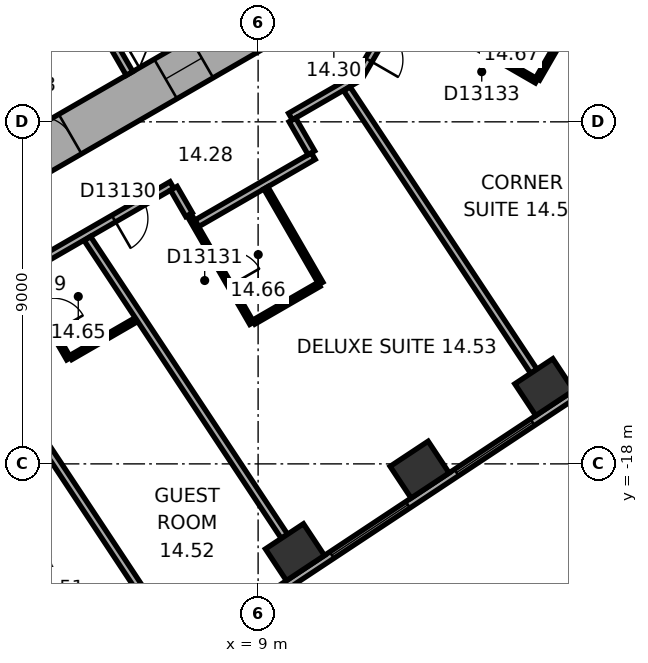
"""IFC4 building model, lengths in metres.
Left out: names, types, materials, properties, quantities, classifications, styles, units other than length and angle.
Written with IfcOpenShell. Run it as: python <this file> out.ifc"""

import sys

from ifc_helpers import new_model, si_unit, direction, frame, frame_2d, origin, origin_2d, place, context, subcontext, project, spatial, rectangle, extrude, element, fill, save


model = new_model("IFC4")
c1 = context("Model", 3, precision=1e-05, world=origin(), true_north=direction((0.0, 1.0)))
c2 = subcontext(c1, "Body", "Model", "MODEL_VIEW")
j1 = project(units=[si_unit("LENGTHUNIT", "METRE"), si_unit("PLANEANGLEUNIT", "RADIAN")], contexts=[c1])
p1 = place(None, origin())
s1 = spatial("IfcSite", under=j1, at=p1, CompositionType="ELEMENT")
p2 = place(p1, origin())
s2 = spatial("IfcBuilding", under=s1, at=p2, CompositionType="ELEMENT")
p3 = place(p2, frame((0.0, 0.0, 67.1)))
s3 = spatial("IfcBuildingStorey", under=s2, at=p3, CompositionType="ELEMENT", Elevation=67.1)
for number, where, z_axis, x_axis in (
    (1, (9.969, -20.324, 0.0), (0.0, 0.0, 1.0), (0.834, 0.552, 0.0)),
    (2, (13.25, -18.152, 0.0), (0.0, 0.0, 1.0), (0.834, 0.552, 0.0)),
    (3, (16.531, -15.981, 0.0), (0.0, 0.0, 1.0), (0.834, 0.552, 0.0)),
):
    element("IfcColumn", number, at=place(p3, frame(where, z_axis=z_axis, x_axis=x_axis)), inside=s3, PredefinedType="COLUMN", context=c2, shape_type="SweptSolid", body=[
        extrude(rectangle(XDim=1.2, YDim=1.0, at=origin_2d()), origin(), (0.0, 0.0, 1.0), 3.3),
    ])
p4 = place(p3, frame((-0.3, -11.836, 0.0), z_axis=(0.0, 0.0, 1.0), x_axis=(0.866021384402, 0.500006961711, 0.0)))
e4 = element("IfcWall", 4, at=p4, inside=s3, PredefinedType="SHEAR", context=c2, shape_type="SweptSolid", body=[
    extrude(rectangle(XDim=12.355, YDim=1.2, at=frame_2d((6.178, 0.0))), origin(), (0.0, 0.0, 1.0), 3.3),
])
p5 = place(p4, frame((4.128, 0.0, 0.0)))
e5 = element("IfcOpeningElement", 5, at=p5, cuts=e4, PredefinedType="OPENING", context=c2, shape_type="SweptSolid", body=[
    extrude(rectangle(XDim=0.9, YDim=2.1, at=frame_2d((0.45, 1.05))), frame((0.0, 0.61, 0.0), z_axis=(0.0, -1.0, 0.0), x_axis=(1.0, 0.0, 0.0)), (0.0, 0.0, 1.0), 1.22),
])
p6 = place(p4, frame((7.928, 0.0, 0.0)))
e6 = element("IfcOpeningElement", 6, at=p6, cuts=e4, PredefinedType="OPENING", context=c2, shape_type="SweptSolid", body=[
    extrude(rectangle(XDim=1.1, YDim=2.1, at=frame_2d((0.55, 1.05))), frame((0.0, 0.61, 0.0), z_axis=(0.0, -1.0, 0.0), x_axis=(1.0, 0.0, 0.0)), (0.0, 0.0, 1.0), 1.22),
])
p7 = place(p3, frame((3.083, -25.601, 0.0), z_axis=(0.0, 0.0, 1.0), x_axis=(0.833884295743, 0.551939291329, 0.0)))
e7 = element("IfcWall", 7, at=p7, inside=s3, PredefinedType="STANDARD", context=c2, shape_type="SweptSolid", body=[
    extrude(rectangle(XDim=21.246, YDim=0.2, at=frame_2d((10.623, 0.0))), origin(), (0.0, 0.0, 1.0), 3.3),
])
p8 = place(p7, frame((1.553, 0.0, 0.8)))
e8 = element("IfcOpeningElement", 8, at=p8, cuts=e7, PredefinedType="OPENING", context=c2, shape_type="SweptSolid", body=[
    extrude(rectangle(XDim=2.4, YDim=1.7, at=frame_2d((1.2, 0.85))), frame((0.0, 0.11, 0.0), z_axis=(0.0, -1.0, 0.0), x_axis=(1.0, 0.0, 0.0)), (0.0, 0.0, 1.0), 0.22),
])
p9 = place(p7, frame((5.488, 0.0, 0.8)))
e9 = element("IfcOpeningElement", 9, at=p9, cuts=e7, PredefinedType="OPENING", context=c2, shape_type="SweptSolid", body=[
    extrude(rectangle(XDim=2.4, YDim=1.7, at=frame_2d((1.2, 0.85))), frame((0.0, 0.11, 0.0), z_axis=(0.0, -1.0, 0.0), x_axis=(1.0, 0.0, 0.0)), (0.0, 0.0, 1.0), 0.22),
])
p10 = place(p7, frame((9.422, 0.0, 0.8)))
e10 = element("IfcOpeningElement", 10, at=p10, cuts=e7, PredefinedType="OPENING", context=c2, shape_type="SweptSolid", body=[
    extrude(rectangle(XDim=2.4, YDim=1.7, at=frame_2d((1.2, 0.85))), frame((0.0, 0.11, 0.0), z_axis=(0.0, -1.0, 0.0), x_axis=(1.0, 0.0, 0.0)), (0.0, 0.0, 1.0), 0.22),
])
p11 = place(p7, frame((13.357, 0.0, 0.8)))
e11 = element("IfcOpeningElement", 11, at=p11, cuts=e7, PredefinedType="OPENING", context=c2, shape_type="SweptSolid", body=[
    extrude(rectangle(XDim=2.4, YDim=1.7, at=frame_2d((1.2, 0.85))), frame((0.0, 0.11, 0.0), z_axis=(0.0, -1.0, 0.0), x_axis=(1.0, 0.0, 0.0)), (0.0, 0.0, 1.0), 0.22),
])
p12 = place(p7, frame((17.291, 0.0, 0.8)))
e12 = element("IfcOpeningElement", 12, at=p12, cuts=e7, PredefinedType="OPENING", context=c2, shape_type="SweptSolid", body=[
    extrude(rectangle(XDim=2.4, YDim=1.7, at=frame_2d((1.2, 0.85))), frame((0.0, 0.11, 0.0), z_axis=(0.0, -1.0, 0.0), x_axis=(1.0, 0.0, 0.0)), (0.0, 0.0, 1.0), 0.22),
])
p13 = place(p3, frame((-0.024, -8.559, 0.0), z_axis=(0.0, 0.0, 1.0), x_axis=(0.866026010844, 0.49999894854, 0.0)))
e13 = element("IfcWall", 13, at=p13, inside=s3, PredefinedType="PARTITIONING", context=c2, shape_type="SweptSolid", body=[
    extrude(rectangle(XDim=8.0, YDim=0.2, at=frame_2d((4.0, 0.0))), origin(), (0.0, 0.0, 1.0), 3.05),
])
p14 = place(p3, frame((4.516, -5.822, 0.0), z_axis=(0.0, 0.0, 1.0), x_axis=(0.499946605688, -0.86605622881, 0.0)))
e14 = element("IfcWall", 14, at=p14, inside=s3, PredefinedType="PARTITIONING", context=c2, shape_type="SweptSolid", body=[
    extrude(rectangle(XDim=2.2, YDim=0.2, at=frame_2d((1.1, 0.0))), origin(), (0.0, 0.0, 1.0), 3.05),
])
p15 = place(p3, frame((0.847, -7.767, 0.0), z_axis=(0.0, 0.0, 1.0), x_axis=(0.866027801685, 0.499995846692, 0.0)))
e15 = element("IfcWall", 15, at=p15, inside=s3, PredefinedType="SHEAR", context=c2, shape_type="SweptSolid", body=[
    extrude(rectangle(XDim=7.06, YDim=0.3, at=frame_2d((3.53, 0.0))), origin(), (0.0, 0.0, 1.0), 3.05),
])
p16 = place(p3, frame((1.033, -13.953, 0.0), z_axis=(0.0, 0.0, 1.0), x_axis=(0.866017531406, 0.500013635111, 0.0)))
e16 = element("IfcWall", 16, at=p16, inside=s3, PredefinedType="PARTITIONING", context=c2, shape_type="SweptSolid", body=[
    extrude(rectangle(XDim=6.58, YDim=0.2, at=frame_2d((3.29, 0.0))), origin(), (0.0, 0.0, 1.0), 3.05),
])
p17 = place(p16, frame((0.496, 0.0, 0.0)))
e17 = element("IfcOpeningElement", 17, at=p17, cuts=e16, PredefinedType="OPENING", context=c2, shape_type="SweptSolid", body=[
    extrude(rectangle(XDim=0.9, YDim=2.1, at=frame_2d((0.45, 1.05))), frame((0.0, 0.11, 0.0), z_axis=(0.0, -1.0, 0.0), x_axis=(1.0, 0.0, 0.0)), (0.0, 0.0, 1.0), 0.22),
])
p18 = place(p16, frame((4.811, 0.0, 0.0)))
e18 = element("IfcOpeningElement", 18, at=p18, cuts=e16, PredefinedType="OPENING", context=c2, shape_type="SweptSolid", body=[
    extrude(rectangle(XDim=0.9, YDim=2.1, at=frame_2d((0.45, 1.05))), frame((0.0, 0.11, 0.0), z_axis=(0.0, -1.0, 0.0), x_axis=(1.0, 0.0, 0.0)), (0.0, 0.0, 1.0), 0.22),
])
p19 = place(p3, frame((4.015, -15.233, 0.0), z_axis=(0.0, 0.0, 1.0), x_axis=(-0.499961950354, 0.866047370643, 0.0)))
e19 = element("IfcWall", 19, at=p19, inside=s3, PredefinedType="PARTITIONING", context=c2, shape_type="SweptSolid", body=[
    extrude(rectangle(XDim=2.5, YDim=0.12, at=frame_2d((1.25, 0.0))), origin(), (0.0, 0.0, 1.0), 3.05),
])
p20 = place(p19, frame((0.8, 0.0, 0.0)))
e20 = element("IfcOpeningElement", 20, at=p20, cuts=e19, PredefinedType="OPENING", context=c2, shape_type="SweptSolid", body=[
    extrude(rectangle(XDim=0.9, YDim=2.1, at=frame_2d((0.45, 1.05))), frame((0.0, 0.07, 0.0), z_axis=(0.0, -1.0, 0.0), x_axis=(1.0, 0.0, 0.0)), (0.0, 0.0, 1.0), 0.14),
])
p21 = place(p3, frame((5.798, -14.204, 0.0), z_axis=(0.0, 0.0, 1.0), x_axis=(-0.865972029493, -0.500092435591, 0.0)))
e21 = element("IfcWall", 21, at=p21, inside=s3, PredefinedType="PARTITIONING", context=c2, shape_type="SweptSolid", body=[
    extrude(rectangle(XDim=1.999, YDim=0.12, at=frame_2d((1.0, 0.0))), origin(), (0.0, 0.0, 1.0), 3.05),
])
p22 = place(p3, frame((6.412, -22.079, 0.0), z_axis=(0.0, 0.0, 1.0), x_axis=(-0.551919507115, 0.83389739037, 0.0)))
e22 = element("IfcWall", 22, at=p22, inside=s3, PredefinedType="PARTITIONING", context=c2, shape_type="SweptSolid", body=[
    extrude(rectangle(XDim=9.635, YDim=0.2, at=frame_2d((4.817, 0.0))), origin(), (0.0, 0.0, 1.0), 3.05),
])
p23 = place(p3, frame((6.782, -10.749, 0.0), z_axis=(0.0, 0.0, 1.0), x_axis=(0.500170954823, -0.865926680471, 0.0)))
e23 = element("IfcWall", 23, at=p23, inside=s3, PredefinedType="PARTITIONING", context=c2, shape_type="SweptSolid", body=[
    extrude(rectangle(XDim=0.801, YDim=0.2, at=frame_2d((0.4, 0.0))), origin(), (0.0, 0.0, 1.0), 3.05),
])
p24 = place(p3, frame((7.385, -11.673, 0.0), z_axis=(0.0, 0.0, 1.0), x_axis=(0.866037524642, 0.499979005472, 0.0)))
e24 = element("IfcWall", 24, at=p24, inside=s3, PredefinedType="PARTITIONING", context=c2, shape_type="SweptSolid", body=[
    extrude(rectangle(XDim=3.542, YDim=0.2, at=frame_2d((1.771, 0.0))), origin(), (0.0, 0.0, 1.0), 3.05),
])
p25 = place(p3, frame((8.833, -14.301, 0.0), z_axis=(0.0, 0.0, 1.0), x_axis=(-0.499936836718, 0.866061868051, 0.0)))
e25 = element("IfcWall", 25, at=p25, inside=s3, PredefinedType="PARTITIONING", context=c2, shape_type="SweptSolid", body=[
    extrude(rectangle(XDim=3.188, YDim=0.12, at=frame_2d((1.594, 0.0))), origin(), (0.0, 0.0, 1.0), 3.05),
])
p26 = place(p25, frame((1.144, 0.0, 0.0)))
e26 = element("IfcOpeningElement", 26, at=p26, cuts=e25, PredefinedType="OPENING", context=c2, shape_type="SweptSolid", body=[
    extrude(rectangle(XDim=0.9, YDim=2.1, at=frame_2d((0.45, 1.05))), frame((0.0, 0.07, 0.0), z_axis=(0.0, -1.0, 0.0), x_axis=(1.0, 0.0, 0.0)), (0.0, 0.0, 1.0), 0.14),
])
p27 = place(p3, frame((9.203, -10.738, 0.0), z_axis=(0.0, 0.0, 1.0), x_axis=(0.50005036918, -0.865996321171, 0.0)))
e27 = element("IfcWall", 27, at=p27, inside=s3, PredefinedType="PARTITIONING", context=c2, shape_type="SweptSolid", body=[
    extrude(rectangle(XDim=2.9, YDim=0.12, at=frame_2d((1.45, 0.0))), origin(), (0.0, 0.0, 1.0), 3.05),
])
p28 = place(p3, frame((9.693, -19.907, 0.0), z_axis=(0.0, 0.0, 1.0), x_axis=(-0.551938394837, 0.833884889121, 0.0)))
e28 = element("IfcWall", 28, at=p28, inside=s3, PredefinedType="PARTITIONING", context=c2, shape_type="SweptSolid", body=[
    extrude(rectangle(XDim=9.394, YDim=0.2, at=frame_2d((4.697, 0.0))), origin(), (0.0, 0.0, 1.0), 2.6),
])
p29 = place(p3, frame((9.852, -8.861, 0.0), z_axis=(0.0, 0.0, 1.0), x_axis=(0.866013291437, 0.500020978615, 0.0)))
e29 = element("IfcWall", 29, at=p29, inside=s3, PredefinedType="PARTITIONING", context=c2, shape_type="SweptSolid", body=[
    extrude(rectangle(XDim=2.077, YDim=0.2, at=frame_2d((1.038, 0.0))), origin(), (0.0, 0.0, 1.0), 3.05),
])
p30 = place(p3, frame((10.402, -9.815, 0.0), z_axis=(0.0, 0.0, 1.0), x_axis=(-0.499968756647, 0.866043441391, 0.0)))
e30 = element("IfcWall", 30, at=p30, inside=s3, PredefinedType="PARTITIONING", context=c2, shape_type="SweptSolid", body=[
    extrude(rectangle(XDim=1.001, YDim=0.2, at=frame_2d((0.5, 0.0))), origin(), (0.0, 0.0, 1.0), 3.05),
])
p31 = place(p3, frame((10.601, -13.28, 0.0), z_axis=(0.0, 0.0, 1.0), x_axis=(-0.866044057189, -0.499967689963, 0.0)))
e31 = element("IfcWall", 31, at=p31, inside=s3, PredefinedType="PARTITIONING", context=c2, shape_type="SweptSolid", body=[
    extrude(rectangle(XDim=1.982, YDim=0.12, at=frame_2d((0.991, 0.0))), origin(), (0.0, 0.0, 1.0), 3.05),
])
p32 = place(p3, frame((11.67, -7.788, 0.0), z_axis=(0.0, 0.0, 1.0), x_axis=(0.500063286585, 0.865988862174, 0.0)))
e32 = element("IfcWall", 32, at=p32, inside=s3, PredefinedType="PARTITIONING", context=c2, shape_type="SweptSolid", body=[
    extrude(rectangle(XDim=1.86, YDim=0.2, at=frame_2d((0.93, 0.0))), origin(), (0.0, 0.0, 1.0), 3.05),
])
p33 = place(p32, frame((0.48, 0.0, 0.0)))
e33 = element("IfcOpeningElement", 33, at=p33, cuts=e32, PredefinedType="OPENING", context=c2, shape_type="SweptSolid", body=[
    extrude(rectangle(XDim=0.9, YDim=2.1, at=frame_2d((0.45, 1.05))), frame((0.0, 0.11, 0.0), z_axis=(0.0, -1.0, 0.0), x_axis=(1.0, 0.0, 0.0)), (0.0, 0.0, 1.0), 0.22),
])
p34 = place(p3, frame((16.255, -15.564, 0.0), z_axis=(0.0, 0.0, 1.0), x_axis=(-0.55192208744, 0.833895682562, 0.0)))
e34 = element("IfcWall", 34, at=p34, inside=s3, PredefinedType="PARTITIONING", context=c2, shape_type="SweptSolid", body=[
    extrude(rectangle(XDim=8.913, YDim=0.2, at=frame_2d((4.457, 0.0))), origin(), (0.0, 0.0, 1.0), 2.6),
])
p35 = place(p3, frame((16.326, -7.925, 0.0), z_axis=(0.0, 0.0, 1.0), x_axis=(-0.865997131366, 0.500048966069, 0.0)))
e35 = element("IfcWall", 35, at=p35, inside=s3, PredefinedType="PARTITIONING", context=c2, shape_type="SweptSolid", body=[
    extrude(rectangle(XDim=2.74, YDim=0.12, at=frame_2d((1.37, 0.0))), origin(), (0.0, 0.0, 1.0), 3.05),
])
p36 = place(p35, frame((0.92, 0.0, 0.0)))
e36 = element("IfcOpeningElement", 36, at=p36, cuts=e35, PredefinedType="OPENING", context=c2, shape_type="SweptSolid", body=[
    extrude(rectangle(XDim=0.9, YDim=2.1, at=frame_2d((0.45, 1.05))), frame((0.0, 0.07, 0.0), z_axis=(0.0, -1.0, 0.0), x_axis=(1.0, 0.0, 0.0)), (0.0, 0.0, 1.0), 0.14),
])
p37 = place(p3, frame((17.396, -6.071, 0.0), z_axis=(0.0, 0.0, 1.0), x_axis=(-0.500027264788, -0.866009661879, 0.0)))
e37 = element("IfcWall", 37, at=p37, inside=s3, PredefinedType="PARTITIONING", context=c2, shape_type="SweptSolid", body=[
    extrude(rectangle(XDim=2.08, YDim=0.12, at=frame_2d((1.04, 0.0))), origin(), (0.0, 0.0, 1.0), 3.05),
])
p38 = place(p10, origin())
e38 = element("IfcWindow", 38, at=p38, inside=s3, PartitioningType="SINGLE_PANEL", PredefinedType="WINDOW", context=c2, shape_type="SweptSolid", body=[
    extrude(rectangle(XDim=2.4, YDim=1.7, at=frame_2d((1.2, 0.85))), frame((0.0, 0.03, 0.0), z_axis=(0.0, -1.0, 0.0), x_axis=(1.0, 0.0, 0.0)), (0.0, 0.0, 1.0), 0.06),
])
fill(e10, e38)
p39 = place(p11, origin())
e39 = element("IfcWindow", 39, at=p39, inside=s3, PartitioningType="SINGLE_PANEL", PredefinedType="WINDOW", context=c2, shape_type="SweptSolid", body=[
    extrude(rectangle(XDim=2.4, YDim=1.7, at=frame_2d((1.2, 0.85))), frame((0.0, 0.03, 0.0), z_axis=(0.0, -1.0, 0.0), x_axis=(1.0, 0.0, 0.0)), (0.0, 0.0, 1.0), 0.06),
])
fill(e11, e39)
p40 = place(p5, origin())
e40 = element("IfcDoor", 40, at=p40, inside=s3, OperationType="SINGLE_SWING_LEFT", PredefinedType="DOOR", context=c2, shape_type="SweptSolid", body=[
    extrude(rectangle(XDim=0.9, YDim=2.1, at=frame_2d((0.45, 1.05))), frame((0.0, 0.025, 0.0), z_axis=(0.0, -1.0, 0.0), x_axis=(1.0, 0.0, 0.0)), (0.0, 0.0, 1.0), 0.05),
])
fill(e5, e40)
p41 = place(p6, origin())
e41 = element("IfcDoor", 41, at=p41, inside=s3, OperationType="DOUBLE_DOOR_SLIDING", PredefinedType="DOOR", context=c2, shape_type="SweptSolid", body=[
    extrude(rectangle(XDim=1.1, YDim=2.1, at=frame_2d((0.55, 1.05))), frame((0.0, 0.025, 0.0), z_axis=(0.0, -1.0, 0.0), x_axis=(1.0, 0.0, 0.0)), (0.0, 0.0, 1.0), 0.05),
])
fill(e6, e41)
p42 = place(p20, origin())
e42 = element("IfcDoor", 42, at=p42, inside=s3, OperationType="SINGLE_SWING_LEFT", PredefinedType="DOOR", context=c2, shape_type="SweptSolid", body=[
    extrude(rectangle(XDim=0.9, YDim=2.1, at=frame_2d((0.45, 1.05))), frame((0.0, 0.025, 0.0), z_axis=(0.0, -1.0, 0.0), x_axis=(1.0, 0.0, 0.0)), (0.0, 0.0, 1.0), 0.05),
])
fill(e20, e42)
p43 = place(p18, origin())
e43 = element("IfcDoor", 43, at=p43, inside=s3, OperationType="SINGLE_SWING_LEFT", PredefinedType="DOOR", context=c2, shape_type="SweptSolid", body=[
    extrude(rectangle(XDim=0.9, YDim=2.1, at=frame_2d((0.45, 1.05))), frame((0.0, 0.025, 0.0), z_axis=(0.0, -1.0, 0.0), x_axis=(1.0, 0.0, 0.0)), (0.0, 0.0, 1.0), 0.05),
])
fill(e18, e43)
p44 = place(p26, origin())
e44 = element("IfcDoor", 44, at=p44, inside=s3, OperationType="SINGLE_SWING_LEFT", PredefinedType="DOOR", context=c2, shape_type="SweptSolid", body=[
    extrude(rectangle(XDim=0.9, YDim=2.1, at=frame_2d((0.45, 1.05))), frame((0.0, 0.025, 0.0), z_axis=(0.0, -1.0, 0.0), x_axis=(1.0, 0.0, 0.0)), (0.0, 0.0, 1.0), 0.05),
])
fill(e26, e44)
p45 = place(p33, origin())
e45 = element("IfcDoor", 45, at=p45, inside=s3, OperationType="SINGLE_SWING_LEFT", PredefinedType="DOOR", context=c2, shape_type="SweptSolid", body=[
    extrude(rectangle(XDim=0.9, YDim=2.1, at=frame_2d((0.45, 1.05))), frame((0.0, 0.025, 0.0), z_axis=(0.0, -1.0, 0.0), x_axis=(1.0, 0.0, 0.0)), (0.0, 0.0, 1.0), 0.05),
])
fill(e33, e45)
p46 = place(p36, origin())
e46 = element("IfcDoor", 46, at=p46, inside=s3, OperationType="SINGLE_SWING_LEFT", PredefinedType="DOOR", context=c2, shape_type="SweptSolid", body=[
    extrude(rectangle(XDim=0.9, YDim=2.1, at=frame_2d((0.45, 1.05))), frame((0.0, 0.025, 0.0), z_axis=(0.0, -1.0, 0.0), x_axis=(1.0, 0.0, 0.0)), (0.0, 0.0, 1.0), 0.05),
])
fill(e36, e46)
save(model, sys.argv[1])
